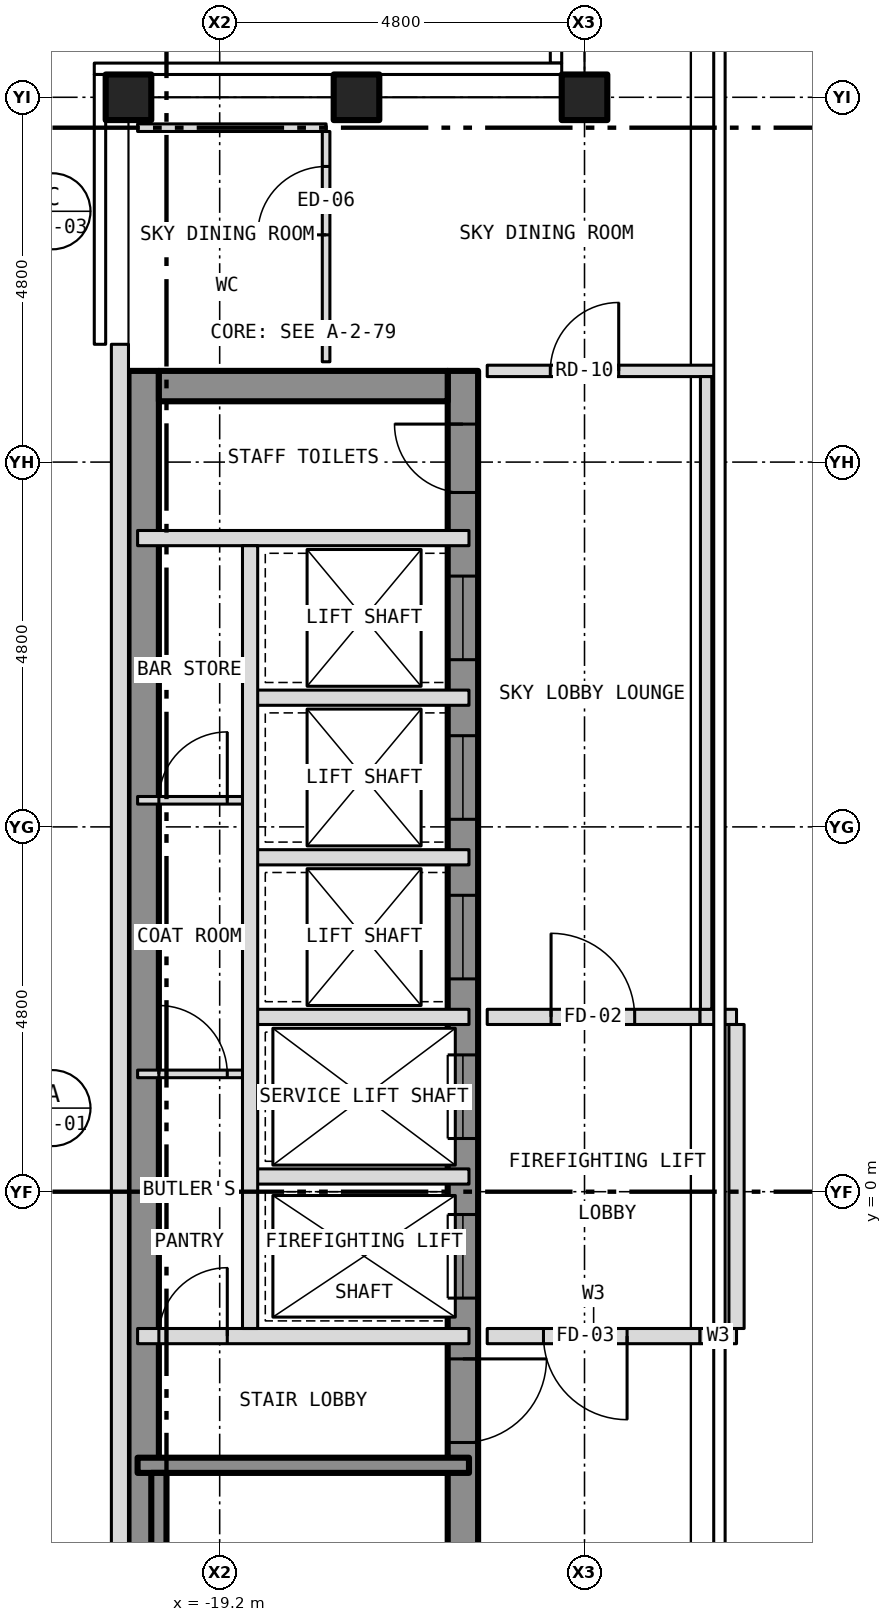
"""IFC4 building model, lengths in metres.
Left out: names, types, materials, properties, quantities, classifications, styles, units other than length and angle.
Written with IfcOpenShell. Run it as: python <this file> out.ifc"""

import sys

from ifc_helpers import new_model, si_unit, direction, frame, frame_2d, origin, origin_2d, place, context, subcontext, project, spatial, rectangle, hollow_rectangle, extrude, element, fill, save


model = new_model("IFC4")
c1 = context("Model", 3, precision=1e-05, world=origin(), true_north=direction((0.0, 1.0)))
c2 = subcontext(c1, "Body", "Model", "MODEL_VIEW")
j1 = project(units=[si_unit("LENGTHUNIT", "METRE"), si_unit("PLANEANGLEUNIT", "RADIAN")], contexts=[c1])
p1 = place(None, origin())
s1 = spatial("IfcSite", under=j1, at=p1, CompositionType="ELEMENT")
p2 = place(p1, origin())
s2 = spatial("IfcBuilding", under=s1, at=p2, CompositionType="ELEMENT")
p3 = place(p2, frame((0.0, 0.0, 286.5)))
s3 = spatial("IfcBuildingStorey", under=s2, at=p3, CompositionType="ELEMENT", Elevation=286.5)
for number, where, z_axis, x_axis in (
    (1, (-20.4, 14.4, -0.15), (0.0, 0.0, 1.0), (1.0, 0.0, 0.0)),
    (2, (-14.4, 14.4, -0.15), (0.0, 0.0, 1.0), (1.0, 0.0, 0.0)),
    (3, (-17.4, 14.4, -0.15), (0.0, 0.0, 1.0), (1.0, 0.0, 0.0)),
):
    element("IfcColumn", number, at=place(p3, frame(where, z_axis=z_axis, x_axis=x_axis)), inside=s3, PredefinedType="COLUMN", context=c2, shape_type="SweptSolid", body=[
        extrude(hollow_rectangle(XDim=0.6, YDim=0.6, WallThickness=0.03, at=origin_2d()), origin(), (0.0, 0.0, 1.0), 3.45),
    ])
p4 = place(p3, frame((-16.0, -10.8, 0.0), z_axis=(0.0, 0.0, 1.0), x_axis=(0.0, 1.0, 0.0)))
e4 = element("IfcWall", 4, at=p4, inside=s3, PredefinedType="SHEAR", context=c2, shape_type="SweptSolid", body=[
    extrude(rectangle(XDim=21.6, YDim=0.4, at=frame_2d((10.8, 0.0))), origin(), (0.0, 0.0, 1.0), 3.25),
])
p5 = place(p4, frame((9.4, 0.0, 0.0)))
e5 = element("IfcOpeningElement", 5, at=p5, cuts=e4, PredefinedType="OPENING", context=c2, shape_type="SweptSolid", body=[
    extrude(rectangle(XDim=1.1, YDim=2.1, at=frame_2d((0.55, 1.05))), frame((0.0, 0.212, 0.0), z_axis=(0.0, -1.0, 0.0), x_axis=(1.0, 0.0, 0.0)), (0.0, 0.0, 1.0), 0.424),
])
p6 = place(p4, frame((11.5, 0.0, 0.0)))
e6 = element("IfcOpeningElement", 6, at=p6, cuts=e4, PredefinedType="OPENING", context=c2, shape_type="SweptSolid", body=[
    extrude(rectangle(XDim=1.1, YDim=2.1, at=frame_2d((0.55, 1.05))), frame((0.0, 0.212, 0.0), z_axis=(0.0, -1.0, 0.0), x_axis=(1.0, 0.0, 0.0)), (0.0, 0.0, 1.0), 0.424),
])
p7 = place(p4, frame((13.6, 0.0, 0.0)))
e7 = element("IfcOpeningElement", 7, at=p7, cuts=e4, PredefinedType="OPENING", context=c2, shape_type="SweptSolid", body=[
    extrude(rectangle(XDim=1.1, YDim=2.1, at=frame_2d((0.55, 1.05))), frame((0.0, 0.212, 0.0), z_axis=(0.0, -1.0, 0.0), x_axis=(1.0, 0.0, 0.0)), (0.0, 0.0, 1.0), 0.424),
])
p8 = place(p4, frame((15.7, 0.0, 0.0)))
e8 = element("IfcOpeningElement", 8, at=p8, cuts=e4, PredefinedType="OPENING", context=c2, shape_type="SweptSolid", body=[
    extrude(rectangle(XDim=1.1, YDim=2.1, at=frame_2d((0.55, 1.05))), frame((0.0, 0.212, 0.0), z_axis=(0.0, -1.0, 0.0), x_axis=(1.0, 0.0, 0.0)), (0.0, 0.0, 1.0), 0.424),
])
p9 = place(p4, frame((17.8, 0.0, 0.0)))
e9 = element("IfcOpeningElement", 9, at=p9, cuts=e4, PredefinedType="OPENING", context=c2, shape_type="SweptSolid", body=[
    extrude(rectangle(XDim=1.1, YDim=2.1, at=frame_2d((0.55, 1.05))), frame((0.0, 0.212, 0.0), z_axis=(0.0, -1.0, 0.0), x_axis=(1.0, 0.0, 0.0)), (0.0, 0.0, 1.0), 0.424),
])
p10 = place(p4, frame((0.458, 0.0, 0.0)))
e10 = element("IfcOpeningElement", 10, at=p10, cuts=e4, PredefinedType="OPENING", context=c2, shape_type="SweptSolid", body=[
    extrude(rectangle(XDim=1.1, YDim=2.1, at=frame_2d((0.55, 1.05))), frame((0.0, 0.212, 0.0), z_axis=(0.0, -1.0, 0.0), x_axis=(1.0, 0.0, 0.0)), (0.0, 0.0, 1.0), 0.424),
])
p11 = place(p4, frame((7.5, 0.0, 0.0)))
e11 = element("IfcOpeningElement", 11, at=p11, cuts=e4, PredefinedType="OPENING", context=c2, shape_type="SweptSolid", body=[
    extrude(rectangle(XDim=1.1, YDim=2.1, at=frame_2d((0.55, 1.05))), frame((0.0, 0.212, 0.0), z_axis=(0.0, -1.0, 0.0), x_axis=(1.0, 0.0, 0.0)), (0.0, 0.0, 1.0), 0.424),
])
p12 = place(p4, frame((20.0, 0.0, 0.0)))
e12 = element("IfcOpeningElement", 12, at=p12, cuts=e4, PredefinedType="OPENING", context=c2, shape_type="SweptSolid", body=[
    extrude(rectangle(XDim=0.9, YDim=2.1, at=frame_2d((0.45, 1.05))), frame((0.0, 0.212, 0.0), z_axis=(0.0, -1.0, 0.0), x_axis=(1.0, 0.0, 0.0)), (0.0, 0.0, 1.0), 0.424),
])
p13 = place(p3, frame((-20.2, -10.8, 0.0), z_axis=(0.0, 0.0, 1.0), x_axis=(0.0, 1.0, 0.0)))
e13 = element("IfcWall", 13, at=p13, inside=s3, PredefinedType="SHEAR", context=c2, shape_type="SweptSolid", body=[
    extrude(rectangle(XDim=21.6, YDim=0.4, at=frame_2d((10.8, 0.0))), origin(), (0.0, 0.0, 1.0), 3.25),
])
p14 = place(p3, frame((-20.0, 10.6, 0.0), z_axis=(0.0, 0.0, 1.0), x_axis=(1.0, 0.0, 0.0)))
e14 = element("IfcWall", 14, at=p14, inside=s3, PredefinedType="SHEAR", context=c2, shape_type="SweptSolid", body=[
    extrude(rectangle(XDim=3.8, YDim=0.4, at=frame_2d((1.9, 0.0))), origin(), (0.0, 0.0, 1.0), 3.25),
])
p15 = place(p3, frame((-20.512, 11.15, 0.0), z_axis=(0.0, 0.0, 1.0), x_axis=(0.0, -1.0, 0.0)))
e15 = element("IfcWall", 15, at=p15, inside=s3, PredefinedType="SOLIDWALL", context=c2, shape_type="SweptSolid", body=[
    extrude(rectangle(XDim=22.3, YDim=0.225, at=frame_2d((11.15, 0.0))), origin(), (0.0, 0.0, 1.0), 3.5),
])
p16 = place(p15, frame((18.4, 0.0, 1.0)))
e16 = element("IfcOpeningElement", 16, at=p16, cuts=e15, PredefinedType="OPENING", context=c2, shape_type="SweptSolid", body=[
    extrude(rectangle(XDim=0.6, YDim=1.5, at=frame_2d((0.3, 0.75))), frame((0.0, 0.125, 0.0), z_axis=(0.0, -1.0, 0.0), x_axis=(1.0, 0.0, 0.0)), (0.0, 0.0, 1.0), 0.249),
])
p17 = place(p3, frame((-20.28, -3.6, 0.0), z_axis=(0.0, 0.0, 1.0), x_axis=(1.0, 0.0, 0.0)))
e17 = element("IfcWall", 17, at=p17, inside=s3, PredefinedType="SHEAR", context=c2, shape_type="SweptSolid", body=[
    extrude(rectangle(XDim=4.36, YDim=0.2, at=frame_2d((2.18, 0.0))), origin(), (0.0, 0.0, 1.0), 3.25),
])
p18 = place(p3, frame((-20.28, -1.9, 0.0), z_axis=(0.0, 0.0, 1.0), x_axis=(1.0, 0.0, 0.0)))
e18 = element("IfcWall", 18, at=p18, inside=s3, PredefinedType="PARTITIONING", context=c2, shape_type="SweptSolid", body=[
    extrude(rectangle(XDim=4.36, YDim=0.2, at=frame_2d((2.18, 0.0))), origin(), (0.0, 0.0, 1.0), 3.25),
])
p19 = place(p18, frame((0.28, 0.0, 0.0)))
e19 = element("IfcOpeningElement", 19, at=p19, cuts=e18, PredefinedType="OPENING", context=c2, shape_type="SweptSolid", body=[
    extrude(rectangle(XDim=0.9, YDim=2.1, at=frame_2d((0.45, 1.05))), frame((0.0, 0.112, 0.0), z_axis=(0.0, -1.0, 0.0), x_axis=(1.0, 0.0, 0.0)), (0.0, 0.0, 1.0), 0.224),
])
p20 = place(p3, frame((-15.68, -1.9, 0.0), z_axis=(0.0, 0.0, 1.0), x_axis=(1.0, 0.0, 0.0)))
e20 = element("IfcWall", 20, at=p20, inside=s3, PredefinedType="PARTITIONING", context=c2, shape_type="SweptSolid", body=[
    extrude(rectangle(XDim=2.8, YDim=0.2, at=frame_2d((1.4, 0.0))), origin(), (0.0, 0.0, 1.0), 3.3),
])
p21 = place(p20, frame((0.74, 0.0, 0.0)))
e21 = element("IfcOpeningElement", 21, at=p21, cuts=e20, PredefinedType="OPENING", context=c2, shape_type="SweptSolid", body=[
    extrude(rectangle(XDim=1.1, YDim=2.1, at=frame_2d((0.55, 1.05))), frame((0.0, 0.112, 0.0), z_axis=(0.0, -1.0, 0.0), x_axis=(1.0, 0.0, 0.0)), (0.0, 0.0, 1.0), 0.224),
])
p22 = place(p3, frame((-12.88, -1.9, 0.0), z_axis=(0.0, 0.0, 1.0), x_axis=(1.0, 0.0, 0.0)))
e22 = element("IfcWall", 22, at=p22, inside=s3, PredefinedType="PARTITIONING", context=c2, shape_type="SweptSolid", body=[
    extrude(rectangle(XDim=0.48, YDim=0.2, at=frame_2d((0.24, 0.0))), origin(), (0.0, 0.0, 1.0), 3.3),
])
p23 = place(p3, frame((-18.8, 0.2, 0.0), z_axis=(0.0, 0.0, 1.0), x_axis=(1.0, 0.0, 0.0)))
e23 = element("IfcWall", 23, at=p23, inside=s3, PredefinedType="PARTITIONING", context=c2, shape_type="SweptSolid", body=[
    extrude(rectangle(XDim=2.88, YDim=0.2, at=frame_2d((1.44, 0.0))), origin(), (0.0, 0.0, 1.0), 3.25),
])
p24 = place(p3, frame((-20.28, 1.55, 0.0), z_axis=(0.0, 0.0, 1.0), x_axis=(1.0, 0.0, 0.0)))
e24 = element("IfcWall", 24, at=p24, inside=s3, PredefinedType="PARTITIONING", context=c2, shape_type="SweptSolid", body=[
    extrude(rectangle(XDim=1.48, YDim=0.1, at=frame_2d((0.74, 0.0))), origin(), (0.0, 0.0, 1.0), 3.25),
])
p25 = place(p24, frame((0.28, 0.0, 0.0)))
e25 = element("IfcOpeningElement", 25, at=p25, cuts=e24, PredefinedType="OPENING", context=c2, shape_type="SweptSolid", body=[
    extrude(rectangle(XDim=0.9, YDim=2.1, at=frame_2d((0.45, 1.05))), frame((0.0, 0.062, 0.0), z_axis=(0.0, -1.0, 0.0), x_axis=(1.0, 0.0, 0.0)), (0.0, 0.0, 1.0), 0.124),
])
p26 = place(p3, frame((-18.8, 2.3, 0.0), z_axis=(0.0, 0.0, 1.0), x_axis=(1.0, 0.0, 0.0)))
e26 = element("IfcWall", 26, at=p26, inside=s3, PredefinedType="PARTITIONING", context=c2, shape_type="SweptSolid", body=[
    extrude(rectangle(XDim=2.88, YDim=0.2, at=frame_2d((1.44, 0.0))), origin(), (0.0, 0.0, 1.0), 3.25),
])
p27 = place(p3, frame((-15.68, 2.3, 0.0), z_axis=(0.0, 0.0, 1.0), x_axis=(1.0, 0.0, 0.0)))
e27 = element("IfcWall", 27, at=p27, inside=s3, PredefinedType="PARTITIONING", context=c2, shape_type="SweptSolid", body=[
    extrude(rectangle(XDim=2.8, YDim=0.2, at=frame_2d((1.4, 0.0))), origin(), (0.0, 0.0, 1.0), 3.3),
])
p28 = place(p27, frame((0.84, 0.0, 0.0)))
e28 = element("IfcOpeningElement", 28, at=p28, cuts=e27, PredefinedType="OPENING", context=c2, shape_type="SweptSolid", body=[
    extrude(rectangle(XDim=1.1, YDim=2.1, at=frame_2d((0.55, 1.05))), frame((0.0, 0.112, 0.0), z_axis=(0.0, -1.0, 0.0), x_axis=(1.0, 0.0, 0.0)), (0.0, 0.0, 1.0), 0.224),
])
p29 = place(p3, frame((-12.88, 2.3, 0.0), z_axis=(0.0, 0.0, 1.0), x_axis=(1.0, 0.0, 0.0)))
e29 = element("IfcWall", 29, at=p29, inside=s3, PredefinedType="PARTITIONING", context=c2, shape_type="SweptSolid", body=[
    extrude(rectangle(XDim=0.48, YDim=0.2, at=frame_2d((0.24, 0.0))), origin(), (0.0, 0.0, 1.0), 3.3),
])
p30 = place(p3, frame((-18.8, 4.4, 0.0), z_axis=(0.0, 0.0, 1.0), x_axis=(1.0, 0.0, 0.0)))
e30 = element("IfcWall", 30, at=p30, inside=s3, PredefinedType="PARTITIONING", context=c2, shape_type="SweptSolid", body=[
    extrude(rectangle(XDim=2.88, YDim=0.2, at=frame_2d((1.44, 0.0))), origin(), (0.0, 0.0, 1.0), 3.25),
])
p31 = place(p3, frame((-20.28, 5.15, 0.0), z_axis=(0.0, 0.0, 1.0), x_axis=(1.0, 0.0, 0.0)))
e31 = element("IfcWall", 31, at=p31, inside=s3, PredefinedType="PARTITIONING", context=c2, shape_type="SweptSolid", body=[
    extrude(rectangle(XDim=1.48, YDim=0.1, at=frame_2d((0.74, 0.0))), origin(), (0.0, 0.0, 1.0), 3.25),
])
p32 = place(p31, frame((0.28, 0.0, 0.0)))
e32 = element("IfcOpeningElement", 32, at=p32, cuts=e31, PredefinedType="OPENING", context=c2, shape_type="SweptSolid", body=[
    extrude(rectangle(XDim=0.9, YDim=2.1, at=frame_2d((0.45, 1.05))), frame((0.0, 0.062, 0.0), z_axis=(0.0, -1.0, 0.0), x_axis=(1.0, 0.0, 0.0)), (0.0, 0.0, 1.0), 0.124),
])
p33 = place(p3, frame((-18.8, 6.5, 0.0), z_axis=(0.0, 0.0, 1.0), x_axis=(1.0, 0.0, 0.0)))
e33 = element("IfcWall", 33, at=p33, inside=s3, PredefinedType="PARTITIONING", context=c2, shape_type="SweptSolid", body=[
    extrude(rectangle(XDim=2.88, YDim=0.2, at=frame_2d((1.44, 0.0))), origin(), (0.0, 0.0, 1.0), 3.25),
])
p34 = place(p3, frame((-20.28, 8.6, 0.0), z_axis=(0.0, 0.0, 1.0), x_axis=(1.0, 0.0, 0.0)))
e34 = element("IfcWall", 34, at=p34, inside=s3, PredefinedType="PARTITIONING", context=c2, shape_type="SweptSolid", body=[
    extrude(rectangle(XDim=4.36, YDim=0.2, at=frame_2d((2.18, 0.0))), origin(), (0.0, 0.0, 1.0), 3.25),
])
p35 = place(p3, frame((-15.68, 10.8, 0.0), z_axis=(0.0, 0.0, 1.0), x_axis=(1.0, 0.0, 0.0)))
e35 = element("IfcWall", 35, at=p35, inside=s3, PredefinedType="PARTITIONING", context=c2, shape_type="SweptSolid", body=[
    extrude(rectangle(XDim=3.01, YDim=0.15, at=frame_2d((1.505, 0.0))), origin(), (0.0, 0.0, 1.0), 3.3),
])
p36 = place(p35, frame((0.83, 0.0, 0.0)))
e36 = element("IfcOpeningElement", 36, at=p36, cuts=e35, PredefinedType="OPENING", context=c2, shape_type="SweptSolid", body=[
    extrude(rectangle(XDim=0.9, YDim=2.1, at=frame_2d((0.45, 1.05))), frame((0.0, 0.087, 0.0), z_axis=(0.0, -1.0, 0.0), x_axis=(1.0, 0.0, 0.0)), (0.0, 0.0, 1.0), 0.174),
])
p37 = place(p3, frame((-20.28, 14.0, 0.0), z_axis=(0.0, 0.0, 1.0), x_axis=(1.0, 0.0, 0.0)))
e37 = element("IfcWall", 37, at=p37, inside=s3, PredefinedType="PARTITIONING", context=c2, shape_type="SweptSolid", body=[
    extrude(rectangle(XDim=2.48, YDim=0.1, at=frame_2d((1.24, 0.0))), origin(), (0.0, 0.0, 1.0), 3.3),
])
p38 = place(p3, frame((-20.0, -10.68, 0.0), z_axis=(0.0, 0.0, 1.0), x_axis=(0.0, 1.0, 0.0)))
e38 = element("IfcWall", 38, at=p38, inside=s3, PredefinedType="SHEAR", context=c2, shape_type="SweptSolid", body=[
    extrude(rectangle(XDim=6.98, YDim=0.2, at=frame_2d((3.49, 0.0))), origin(), (0.0, 0.0, 1.0), 3.25),
])
p39 = place(p3, frame((-18.8, -1.8, 0.0), z_axis=(0.0, 0.0, 1.0), x_axis=(0.0, 1.0, 0.0)))
e39 = element("IfcWall", 39, at=p39, inside=s3, PredefinedType="PARTITIONING", context=c2, shape_type="SweptSolid", body=[
    extrude(rectangle(XDim=10.3, YDim=0.2, at=frame_2d((5.15, 0.0))), origin(), (0.0, 0.0, 1.0), 3.25),
])
p40 = place(p3, frame((-17.8, 10.92, 0.0), z_axis=(0.0, 0.0, 1.0), x_axis=(0.0, 1.0, 0.0)))
e40 = element("IfcWall", 40, at=p40, inside=s3, PredefinedType="PARTITIONING", context=c2, shape_type="SweptSolid", body=[
    extrude(rectangle(XDim=3.03, YDim=0.1, at=frame_2d((1.515, 0.0))), origin(), (0.0, 0.0, 1.0), 3.3),
])
p41 = place(p40, frame((1.67, 0.0, 0.0)))
e41 = element("IfcOpeningElement", 41, at=p41, cuts=e40, PredefinedType="OPENING", context=c2, shape_type="SweptSolid", body=[
    extrude(rectangle(XDim=0.9, YDim=2.1, at=frame_2d((0.45, 1.05))), frame((0.0, 0.062, 0.0), z_axis=(0.0, -1.0, 0.0), x_axis=(1.0, 0.0, 0.0)), (0.0, 0.0, 1.0), 0.124),
])
p42 = place(p3, frame((-12.8, 2.4, 0.0), z_axis=(0.0, 0.0, 1.0), x_axis=(0.0, 1.0, 0.0)))
e42 = element("IfcWall", 42, at=p42, inside=s3, PredefinedType="PARTITIONING", context=c2, shape_type="SweptSolid", body=[
    extrude(rectangle(XDim=8.325, YDim=0.15, at=frame_2d((4.163, 0.0))), origin(), (0.0, 0.0, 1.0), 3.3),
])
p43 = place(p3, frame((-12.4, -1.8, 0.0), z_axis=(0.0, 0.0, 1.0), x_axis=(0.0, 1.0, 0.0)))
e43 = element("IfcWall", 43, at=p43, inside=s3, PredefinedType="PARTITIONING", context=c2, shape_type="SweptSolid", body=[
    extrude(rectangle(XDim=4.0, YDim=0.2, at=frame_2d((2.0, 0.0))), origin(), (0.0, 0.0, 1.0), 3.3),
])
p44 = place(p5, origin())
e44 = element("IfcDoor", 44, at=p44, inside=s3, OperationType="SLIDING_TO_LEFT", PredefinedType="DOOR", context=c2, shape_type="SweptSolid", body=[
    extrude(rectangle(XDim=1.1, YDim=2.1, at=frame_2d((0.55, 1.05))), frame((0.0, 0.025, 0.0), z_axis=(0.0, -1.0, 0.0), x_axis=(1.0, 0.0, 0.0)), (0.0, 0.0, 1.0), 0.05),
])
fill(e5, e44)
p45 = place(p6, origin())
e45 = element("IfcDoor", 45, at=p45, inside=s3, OperationType="SLIDING_TO_LEFT", PredefinedType="DOOR", context=c2, shape_type="SweptSolid", body=[
    extrude(rectangle(XDim=1.1, YDim=2.1, at=frame_2d((0.55, 1.05))), frame((0.0, 0.025, 0.0), z_axis=(0.0, -1.0, 0.0), x_axis=(1.0, 0.0, 0.0)), (0.0, 0.0, 1.0), 0.05),
])
fill(e6, e45)
p46 = place(p7, origin())
e46 = element("IfcDoor", 46, at=p46, inside=s3, OperationType="SLIDING_TO_LEFT", PredefinedType="DOOR", context=c2, shape_type="SweptSolid", body=[
    extrude(rectangle(XDim=1.1, YDim=2.1, at=frame_2d((0.55, 1.05))), frame((0.0, 0.025, 0.0), z_axis=(0.0, -1.0, 0.0), x_axis=(1.0, 0.0, 0.0)), (0.0, 0.0, 1.0), 0.05),
])
fill(e7, e46)
p47 = place(p8, origin())
e47 = element("IfcDoor", 47, at=p47, inside=s3, OperationType="SLIDING_TO_LEFT", PredefinedType="DOOR", context=c2, shape_type="SweptSolid", body=[
    extrude(rectangle(XDim=1.1, YDim=2.1, at=frame_2d((0.55, 1.05))), frame((0.0, 0.025, 0.0), z_axis=(0.0, -1.0, 0.0), x_axis=(1.0, 0.0, 0.0)), (0.0, 0.0, 1.0), 0.05),
])
fill(e8, e47)
p48 = place(p9, origin())
e48 = element("IfcDoor", 48, at=p48, inside=s3, OperationType="SLIDING_TO_LEFT", PredefinedType="DOOR", context=c2, shape_type="SweptSolid", body=[
    extrude(rectangle(XDim=1.1, YDim=2.1, at=frame_2d((0.55, 1.05))), frame((0.0, 0.025, 0.0), z_axis=(0.0, -1.0, 0.0), x_axis=(1.0, 0.0, 0.0)), (0.0, 0.0, 1.0), 0.05),
])
fill(e9, e48)
p49 = place(p11, origin())
e49 = element("IfcDoor", 49, at=p49, inside=s3, OperationType="SINGLE_SWING_RIGHT", PredefinedType="DOOR", context=c2, shape_type="SweptSolid", body=[
    extrude(rectangle(XDim=1.1, YDim=2.1, at=frame_2d((0.55, 1.05))), frame((0.0, 0.025, 0.0), z_axis=(0.0, -1.0, 0.0), x_axis=(1.0, 0.0, 0.0)), (0.0, 0.0, 1.0), 0.05),
])
fill(e11, e49)
p50 = place(p12, origin())
e50 = element("IfcDoor", 50, at=p50, inside=s3, OperationType="SINGLE_SWING_RIGHT", PredefinedType="DOOR", context=c2, shape_type="SweptSolid", body=[
    extrude(rectangle(XDim=0.9, YDim=2.1, at=frame_2d((0.45, 1.05))), frame((0.0, 0.025, 0.0), z_axis=(0.0, -1.0, 0.0), x_axis=(1.0, 0.0, 0.0)), (0.0, 0.0, 1.0), 0.05),
])
fill(e12, e50)
p51 = place(p19, origin())
e51 = element("IfcDoor", 51, at=p51, inside=s3, OperationType="SINGLE_SWING_RIGHT", PredefinedType="DOOR", context=c2, shape_type="SweptSolid", body=[
    extrude(rectangle(XDim=0.9, YDim=2.1, at=frame_2d((0.45, 1.05))), frame((0.0, 0.025, 0.0), z_axis=(0.0, -1.0, 0.0), x_axis=(1.0, 0.0, 0.0)), (0.0, 0.0, 1.0), 0.05),
])
fill(e19, e51)
p52 = place(p25, origin())
e52 = element("IfcDoor", 52, at=p52, inside=s3, OperationType="SINGLE_SWING_LEFT", PredefinedType="DOOR", context=c2, shape_type="SweptSolid", body=[
    extrude(rectangle(XDim=0.9, YDim=2.1, at=frame_2d((0.45, 1.05))), frame((0.0, 0.025, 0.0), z_axis=(0.0, -1.0, 0.0), x_axis=(1.0, 0.0, 0.0)), (0.0, 0.0, 1.0), 0.05),
])
fill(e25, e52)
p53 = place(p32, origin())
e53 = element("IfcDoor", 53, at=p53, inside=s3, OperationType="SINGLE_SWING_RIGHT", PredefinedType="DOOR", context=c2, shape_type="SweptSolid", body=[
    extrude(rectangle(XDim=0.9, YDim=2.1, at=frame_2d((0.45, 1.05))), frame((0.0, 0.025, 0.0), z_axis=(0.0, -1.0, 0.0), x_axis=(1.0, 0.0, 0.0)), (0.0, 0.0, 1.0), 0.05),
])
fill(e32, e53)
p54 = place(p28, origin())
e54 = element("IfcDoor", 54, at=p54, inside=s3, OperationType="SINGLE_SWING_LEFT", PredefinedType="DOOR", context=c2, shape_type="SweptSolid", body=[
    extrude(rectangle(XDim=1.1, YDim=2.1, at=frame_2d((0.55, 1.05))), frame((0.0, 0.025, 0.0), z_axis=(0.0, -1.0, 0.0), x_axis=(1.0, 0.0, 0.0)), (0.0, 0.0, 1.0), 0.05),
])
fill(e28, e54)
p55 = place(p21, origin())
e55 = element("IfcDoor", 55, at=p55, inside=s3, OperationType="SINGLE_SWING_RIGHT", PredefinedType="DOOR", context=c2, shape_type="SweptSolid", body=[
    extrude(rectangle(XDim=1.1, YDim=2.1, at=frame_2d((0.55, 1.05))), frame((0.0, 0.025, 0.0), z_axis=(0.0, -1.0, 0.0), x_axis=(1.0, 0.0, 0.0)), (0.0, 0.0, 1.0), 0.05),
])
fill(e21, e55)
p56 = place(p36, origin())
e56 = element("IfcDoor", 56, at=p56, inside=s3, OperationType="SINGLE_SWING_RIGHT", PredefinedType="DOOR", context=c2, shape_type="SweptSolid", body=[
    extrude(rectangle(XDim=0.9, YDim=2.1, at=frame_2d((0.45, 1.05))), frame((0.0, 0.025, 0.0), z_axis=(0.0, -1.0, 0.0), x_axis=(1.0, 0.0, 0.0)), (0.0, 0.0, 1.0), 0.05),
])
fill(e36, e56)
p57 = place(p41, origin())
e57 = element("IfcDoor", 57, at=p57, inside=s3, OperationType="SINGLE_SWING_LEFT", PredefinedType="DOOR", context=c2, shape_type="SweptSolid", body=[
    extrude(rectangle(XDim=0.9, YDim=2.1, at=frame_2d((0.45, 1.05))), frame((0.0, 0.025, 0.0), z_axis=(0.0, -1.0, 0.0), x_axis=(1.0, 0.0, 0.0)), (0.0, 0.0, 1.0), 0.05),
])
fill(e41, e57)
save(model, sys.argv[1])
